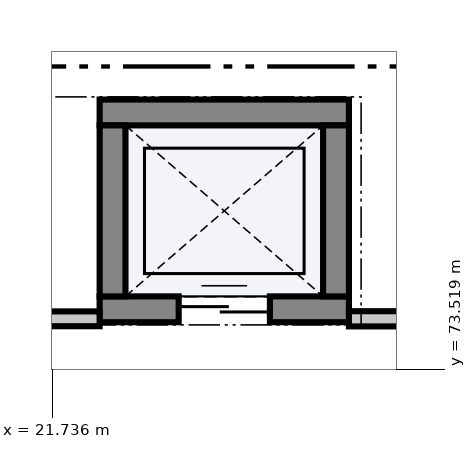
"""IFC4 building model, lengths in metres.
Left out: names, types, materials, properties, quantities, classifications, styles, units other than length and angle.
Written with IfcOpenShell. Run it as: python <this file> out.ifc"""

import sys

from ifc_helpers import new_model, si_unit, direction, frame, frame_2d, origin, place, context, subcontext, project, spatial, rectangle, extrude, element, fill, save


model = new_model("IFC4")
c1 = context("Model", 3, precision=1e-05, world=origin(), true_north=direction((0.0, 1.0)))
c2 = subcontext(c1, "Body", "Model", "MODEL_VIEW")
j1 = project(units=[si_unit("LENGTHUNIT", "METRE"), si_unit("PLANEANGLEUNIT", "RADIAN")], contexts=[c1])
p1 = place(None, origin())
s1 = spatial("IfcSite", under=j1, at=p1, CompositionType="ELEMENT")
p2 = place(p1, origin())
s2 = spatial("IfcBuilding", under=s1, at=p2, CompositionType="ELEMENT")
p3 = place(p2, frame((0.0, 0.0, 24.6)))
s3 = spatial("IfcBuildingStorey", under=s2, at=p3, CompositionType="ELEMENT", Elevation=24.6)
p4 = place(p3, frame((22.36, 74.305, 0.0), z_axis=(0.0, 0.0, 1.0), x_axis=(1.0, 0.0, 0.0)))
e1 = element("IfcWall", 1, at=p4, inside=s3, PredefinedType="SHEAR", context=c2, shape_type="SweptSolid", body=[
    extrude(rectangle(XDim=3.28, YDim=0.34, at=frame_2d((1.64, 0.0))), origin(), (0.0, 0.0, 1.0), 4.51),
])
p5 = place(p4, frame((1.04, 0.0, 0.0)))
e2 = element("IfcOpeningElement", 2, at=p5, cuts=e1, PredefinedType="OPENING", context=c2, shape_type="SweptSolid", body=[
    extrude(rectangle(XDim=1.2, YDim=2.2, at=frame_2d((0.6, 1.1))), frame((0.0, 0.182, 0.0), z_axis=(0.0, -1.0, 0.0), x_axis=(1.0, 0.0, 0.0)), (0.0, 0.0, 1.0), 0.364),
])
p6 = place(p3, frame((22.36, 76.895, 0.0), z_axis=(0.0, 0.0, 1.0), x_axis=(1.0, 0.0, 0.0)))
e3 = element("IfcWall", 3, at=p6, inside=s3, PredefinedType="SHEAR", context=c2, shape_type="SweptSolid", body=[
    extrude(rectangle(XDim=3.28, YDim=0.34, at=frame_2d((1.64, 0.0))), origin(), (0.0, 0.0, 1.0), 4.51),
])
for number, where, z_axis, x_axis in (
    (4, (22.53, 74.475, 0.0), (0.0, 0.0, 1.0), (0.0, 1.0, 0.0)),
    (5, (25.47, 74.475, 0.0), (0.0, 0.0, 1.0), (0.0, 1.0, 0.0)),
):
    element("IfcWall", number, at=place(p3, frame(where, z_axis=z_axis, x_axis=x_axis)), inside=s3, PredefinedType="SHEAR", context=c2, shape_type="SweptSolid", body=[
        extrude(rectangle(XDim=2.25, YDim=0.34, at=frame_2d((1.125, 0.0))), origin(), (0.0, 0.0, 1.0), 4.51),
    ])
p7 = place(p3, frame((35.46, 74.18, 0.0), z_axis=(0.0, 0.0, 1.0), x_axis=(-1.0, 0.0, 0.0)))
e6 = element("IfcWall", 6, at=p7, inside=s3, PredefinedType="PARTITIONING", context=c2, shape_type="SweptSolid", body=[
    extrude(rectangle(XDim=9.82, YDim=0.2, at=frame_2d((4.91, 0.0))), origin(), (0.0, 0.0, 1.0), 4.51),
])
p8 = place(p3, frame((22.36, 74.18, 0.0), z_axis=(0.0, 0.0, 1.0), x_axis=(-1.0, 0.0, 0.0)))
e7 = element("IfcWall", 7, at=p8, inside=s3, PredefinedType="PARTITIONING", context=c2, shape_type="SweptSolid", body=[
    extrude(rectangle(XDim=6.32, YDim=0.195, at=frame_2d((3.16, 0.0))), origin(), (0.0, 0.0, 1.0), 4.51),
])
p9 = place(p5, origin())
e8 = element("IfcDoor", 8, at=p9, inside=s3, OperationType="DOUBLE_DOOR_SLIDING", PredefinedType="DOOR", context=c2, shape_type="SweptSolid", body=[
    extrude(rectangle(XDim=1.2, YDim=2.2, at=frame_2d((0.6, 1.1))), frame((0.0, 0.025, 0.0), z_axis=(0.0, -1.0, 0.0), x_axis=(1.0, 0.0, 0.0)), (0.0, 0.0, 1.0), 0.05),
])
fill(e2, e8)
save(model, sys.argv[1])
